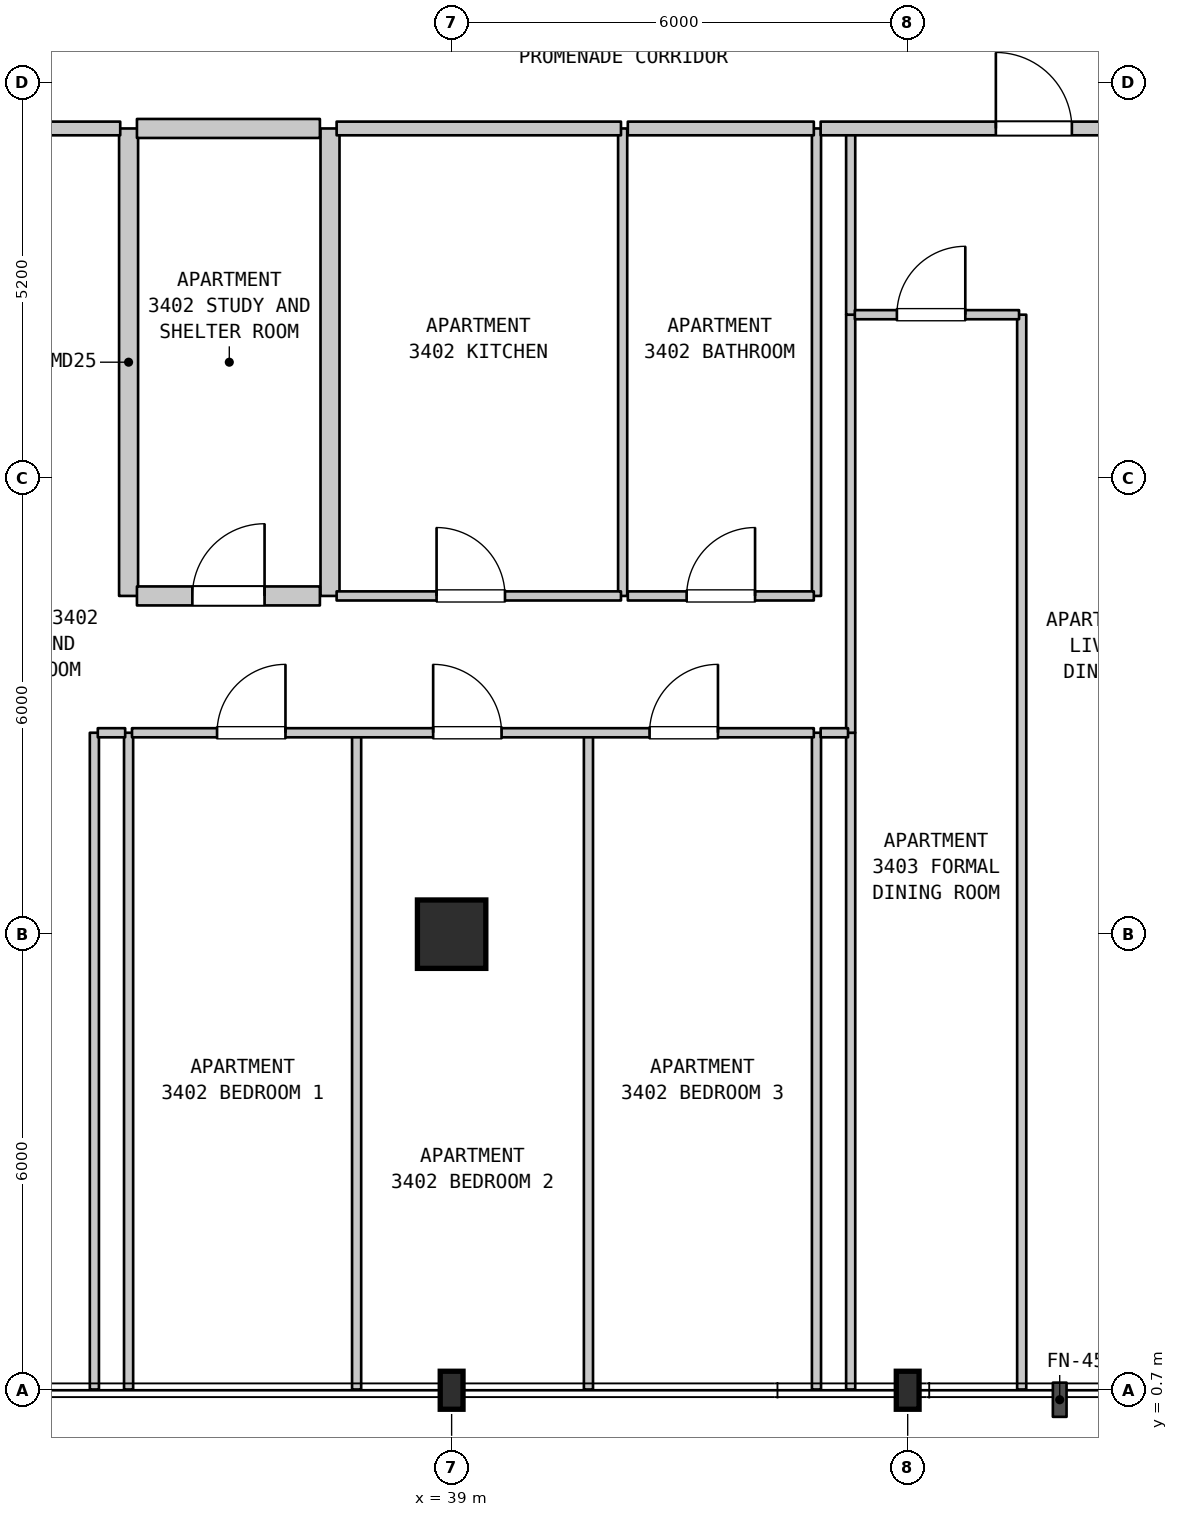
"""IFC4 building model, lengths in metres.
Left out: names, types, materials, properties, quantities, classifications, styles, units other than length and angle.
Written with IfcOpenShell. Run it as: python <this file> out.ifc"""

import sys

from ifc_helpers import new_model, si_unit, direction, frame, frame_2d, origin, origin_2d, place, context, subcontext, project, spatial, rectangle, i_section, extrude, element, fill, save


model = new_model("IFC4")
c1 = context("Model", 3, precision=1e-05, world=origin(), true_north=direction((0.0, 1.0)))
c2 = subcontext(c1, "Body", "Model", "MODEL_VIEW")
j1 = project(units=[si_unit("LENGTHUNIT", "METRE"), si_unit("PLANEANGLEUNIT", "RADIAN")], contexts=[c1])
p1 = place(None, origin())
s1 = spatial("IfcSite", under=j1, at=p1, CompositionType="ELEMENT")
p2 = place(p1, origin())
s2 = spatial("IfcBuilding", under=s1, at=p2, CompositionType="ELEMENT")
p3 = place(p2, frame((0.0, 0.0, 140.9)))
s3 = spatial("IfcBuildingStorey", under=s2, at=p3, CompositionType="ELEMENT", Elevation=140.9)
p4 = place(p3, frame((39.0, 0.7, 0.0), z_axis=(0.0, 0.0, 1.0), x_axis=(1.0, 0.0, 0.0)))
e1 = element("IfcColumn", 1, at=p4, inside=s3, PredefinedType="COLUMN", context=c2, shape_type="SweptSolid", body=[
    extrude(i_section(OverallWidth=0.3, OverallDepth=0.5, WebThickness=0.014, FlangeThickness=0.028, FilletRadius=0.027, at=origin_2d()), origin(), (0.0, 0.0, 1.0), 3.7),
])
p5 = place(p3, frame((39.0, 6.7, 0.0), z_axis=(0.0, 0.0, 1.0), x_axis=(1.0, 0.0, 0.0)))
e2 = element("IfcColumn", 2, at=p5, inside=s3, PredefinedType="COLUMN", context=c2, shape_type="SweptSolid", body=[
    extrude(rectangle(XDim=0.9, YDim=0.9, at=origin_2d()), origin(), (0.0, 0.0, 1.0), 3.7),
])
p6 = place(p3, frame((45.0, 0.7, 0.0), z_axis=(0.0, 0.0, 1.0), x_axis=(1.0, 0.0, 0.0)))
e3 = element("IfcColumn", 3, at=p6, inside=s3, PredefinedType="COLUMN", context=c2, shape_type="SweptSolid", body=[
    extrude(i_section(OverallWidth=0.3, OverallDepth=0.5, WebThickness=0.014, FlangeThickness=0.028, FilletRadius=0.027, at=origin_2d()), origin(), (0.0, 0.0, 1.0), 3.7),
])
for number, where, z_axis, x_axis in (
    (4, (34.3, 0.71, 0.0), (0.0, 0.0, 1.0), (0.0, 1.0, 0.0)),
    (5, (34.75, 0.71, 0.0), (0.0, 0.0, 1.0), (0.0, 1.0, 0.0)),
):
    element("IfcWall", number, at=place(p3, frame(where, z_axis=z_axis, x_axis=x_axis)), inside=s3, PredefinedType="PARTITIONING", context=c2, shape_type="SweptSolid", body=[
        extrude(rectangle(XDim=8.64, YDim=0.12, at=frame_2d((4.32, 0.0))), origin(), (0.0, 0.0, 1.0), 3.385),
    ])
for number, where, z_axis, x_axis in (
    (6, (34.75, 11.15, 0.0), (0.0, 0.0, 1.0), (0.0, 1.0, 0.0)),
    (7, (37.4, 11.15, 0.0), (0.0, 0.0, 1.0), (0.0, 1.0, 0.0)),
):
    element("IfcWall", number, at=place(p3, frame(where, z_axis=z_axis, x_axis=x_axis)), inside=s3, PredefinedType="STANDARD", context=c2, shape_type="SweptSolid", body=[
        extrude(rectangle(XDim=6.15, YDim=0.25, at=frame_2d((3.075, 0.0))), origin(), (0.0, 0.0, 1.0), 3.385),
    ])
for number, where, z_axis, x_axis in (
    (8, (37.75, 0.71, 0.0), (0.0, 0.0, 1.0), (0.0, 1.0, 0.0)),
    (9, (40.8, 0.71, 0.0), (0.0, 0.0, 1.0), (0.0, 1.0, 0.0)),
):
    element("IfcWall", number, at=place(p3, frame(where, z_axis=z_axis, x_axis=x_axis)), inside=s3, PredefinedType="PARTITIONING", context=c2, shape_type="SweptSolid", body=[
        extrude(rectangle(XDim=8.64, YDim=0.12, at=frame_2d((4.32, 0.0))), origin(), (0.0, 0.0, 1.0), 3.385),
    ])
p7 = place(p3, frame((41.25, 11.15, 0.0), z_axis=(0.0, 0.0, 1.0), x_axis=(0.0, 1.0, 0.0)))
e10 = element("IfcWall", 10, at=p7, inside=s3, PredefinedType="PARTITIONING", context=c2, shape_type="SweptSolid", body=[
    extrude(rectangle(XDim=6.15, YDim=0.12, at=frame_2d((3.075, 0.0))), origin(), (0.0, 0.0, 1.0), 3.385),
])
p8 = place(p3, frame((43.8, 0.71, 0.0), z_axis=(0.0, 0.0, 1.0), x_axis=(0.0, 1.0, 0.0)))
e11 = element("IfcWall", 11, at=p8, inside=s3, PredefinedType="PARTITIONING", context=c2, shape_type="SweptSolid", body=[
    extrude(rectangle(XDim=8.64, YDim=0.12, at=frame_2d((4.32, 0.0))), origin(), (0.0, 0.0, 1.0), 3.385),
])
p9 = place(p3, frame((43.8, 11.15, 0.0), z_axis=(0.0, 0.0, 1.0), x_axis=(0.0, 1.0, 0.0)))
e12 = element("IfcWall", 12, at=p9, inside=s3, PredefinedType="PARTITIONING", context=c2, shape_type="SweptSolid", body=[
    extrude(rectangle(XDim=6.15, YDim=0.12, at=frame_2d((3.075, 0.0))), origin(), (0.0, 0.0, 1.0), 3.385),
])
p10 = place(p3, frame((44.25, 0.71, 0.0), z_axis=(0.0, 0.0, 1.0), x_axis=(0.0, 1.0, 0.0)))
e13 = element("IfcWall", 13, at=p10, inside=s3, PredefinedType="PARTITIONING", context=c2, shape_type="SweptSolid", body=[
    extrude(rectangle(XDim=8.64, YDim=0.12, at=frame_2d((4.32, 0.0))), origin(), (0.0, 0.0, 1.0), 3.385),
])
p11 = place(p3, frame((44.25, 9.35, 0.0), z_axis=(0.0, 0.0, 1.0), x_axis=(0.0, 1.0, 0.0)))
e14 = element("IfcWall", 14, at=p11, inside=s3, PredefinedType="PARTITIONING", context=c2, shape_type="SweptSolid", body=[
    extrude(rectangle(XDim=5.5, YDim=0.12, at=frame_2d((2.75, 0.0))), origin(), (0.0, 0.0, 1.0), 3.385),
])
p12 = place(p3, frame((44.25, 14.85, 0.0), z_axis=(0.0, 0.0, 1.0), x_axis=(0.0, 1.0, 0.0)))
e15 = element("IfcWall", 15, at=p12, inside=s3, PredefinedType="PARTITIONING", context=c2, shape_type="SweptSolid", body=[
    extrude(rectangle(XDim=2.45, YDim=0.12, at=frame_2d((1.225, 0.0))), origin(), (0.0, 0.0, 1.0), 3.385),
])
p13 = place(p3, frame((46.5, 0.71, 0.0), z_axis=(0.0, 0.0, 1.0), x_axis=(0.0, 1.0, 0.0)))
e16 = element("IfcWall", 16, at=p13, inside=s3, PredefinedType="PARTITIONING", context=c2, shape_type="SweptSolid", body=[
    extrude(rectangle(XDim=14.14, YDim=0.12, at=frame_2d((7.07, 0.0))), origin(), (0.0, 0.0, 1.0), 3.385),
])
p14 = place(p3, frame((34.345, 9.35, 0.0), z_axis=(0.0, 0.0, 1.0), x_axis=(1.0, 0.0, 0.0)))
e17 = element("IfcWall", 17, at=p14, inside=s3, PredefinedType="PARTITIONING", context=c2, shape_type="SweptSolid", body=[
    extrude(rectangle(XDim=0.36, YDim=0.12, at=frame_2d((0.18, 0.0))), origin(), (0.0, 0.0, 1.0), 3.385),
])
p15 = place(p3, frame((34.795, 9.35, 0.0), z_axis=(0.0, 0.0, 1.0), x_axis=(1.0, 0.0, 0.0)))
e18 = element("IfcWall", 18, at=p15, inside=s3, PredefinedType="PARTITIONING", context=c2, shape_type="SweptSolid", body=[
    extrude(rectangle(XDim=8.97, YDim=0.12, at=frame_2d((4.485, 0.0))), origin(), (0.0, 0.0, 1.0), 3.385),
])
p16 = place(p15, frame((1.119, 0.0, 0.0)))
e19 = element("IfcOpeningElement", 19, at=p16, cuts=e18, PredefinedType="OPENING", context=c2, shape_type="SweptSolid", body=[
    extrude(rectangle(XDim=0.9, YDim=2.15, at=frame_2d((0.45, 1.075))), frame((0.0, 0.07, 0.0), z_axis=(0.0, -1.0, 0.0), x_axis=(1.0, 0.0, 0.0)), (0.0, 0.0, 1.0), 0.14),
])
p17 = place(p15, frame((3.962, 0.0, 0.0)))
e20 = element("IfcOpeningElement", 20, at=p17, cuts=e18, PredefinedType="OPENING", context=c2, shape_type="SweptSolid", body=[
    extrude(rectangle(XDim=0.9, YDim=2.15, at=frame_2d((0.45, 1.075))), frame((0.0, 0.07, 0.0), z_axis=(0.0, -1.0, 0.0), x_axis=(1.0, 0.0, 0.0)), (0.0, 0.0, 1.0), 0.14),
])
p18 = place(p15, frame((6.809, 0.0, 0.0)))
e21 = element("IfcOpeningElement", 21, at=p18, cuts=e18, PredefinedType="OPENING", context=c2, shape_type="SweptSolid", body=[
    extrude(rectangle(XDim=0.9, YDim=2.15, at=frame_2d((0.45, 1.075))), frame((0.0, 0.07, 0.0), z_axis=(0.0, -1.0, 0.0), x_axis=(1.0, 0.0, 0.0)), (0.0, 0.0, 1.0), 0.14),
])
p19 = place(p3, frame((43.855, 9.35, 0.0), z_axis=(0.0, 0.0, 1.0), x_axis=(1.0, 0.0, 0.0)))
e22 = element("IfcWall", 22, at=p19, inside=s3, PredefinedType="PARTITIONING", context=c2, shape_type="SweptSolid", body=[
    extrude(rectangle(XDim=0.36, YDim=0.12, at=frame_2d((0.18, 0.0))), origin(), (0.0, 0.0, 1.0), 3.385),
])
p20 = place(p3, frame((34.86, 11.15, 0.0), z_axis=(0.0, 0.0, 1.0), x_axis=(1.0, 0.0, 0.0)))
e23 = element("IfcWall", 23, at=p20, inside=s3, PredefinedType="STANDARD", context=c2, shape_type="SweptSolid", body=[
    extrude(rectangle(XDim=2.407, YDim=0.25, at=frame_2d((1.204, 0.0))), origin(), (0.0, 0.0, 1.0), 3.385),
])
p21 = place(p20, frame((0.729, 0.0, 0.0)))
e24 = element("IfcOpeningElement", 24, at=p21, cuts=e23, PredefinedType="OPENING", context=c2, shape_type="SweptSolid", body=[
    extrude(rectangle(XDim=0.95, YDim=2.15, at=frame_2d((0.475, 1.075))), frame((0.0, 0.135, 0.0), z_axis=(0.0, -1.0, 0.0), x_axis=(1.0, 0.0, 0.0)), (0.0, 0.0, 1.0), 0.27),
])
p22 = place(p3, frame((37.487, 11.15, 0.0), z_axis=(0.0, 0.0, 1.0), x_axis=(1.0, 0.0, 0.0)))
e25 = element("IfcWall", 25, at=p22, inside=s3, PredefinedType="PARTITIONING", context=c2, shape_type="SweptSolid", body=[
    extrude(rectangle(XDim=3.741, YDim=0.12, at=frame_2d((1.871, 0.0))), origin(), (0.0, 0.0, 1.0), 3.385),
])
p23 = place(p22, frame((1.315, 0.0, 0.0)))
e26 = element("IfcOpeningElement", 26, at=p23, cuts=e25, PredefinedType="OPENING", context=c2, shape_type="SweptSolid", body=[
    extrude(rectangle(XDim=0.9, YDim=2.15, at=frame_2d((0.45, 1.075))), frame((0.0, 0.07, 0.0), z_axis=(0.0, -1.0, 0.0), x_axis=(1.0, 0.0, 0.0)), (0.0, 0.0, 1.0), 0.14),
])
p24 = place(p3, frame((41.318, 11.15, 0.0), z_axis=(0.0, 0.0, 1.0), x_axis=(1.0, 0.0, 0.0)))
e27 = element("IfcWall", 27, at=p24, inside=s3, PredefinedType="PARTITIONING", context=c2, shape_type="SweptSolid", body=[
    extrude(rectangle(XDim=2.447, YDim=0.12, at=frame_2d((1.223, 0.0))), origin(), (0.0, 0.0, 1.0), 3.385),
])
p25 = place(p24, frame((0.774, 0.0, 0.0)))
e28 = element("IfcOpeningElement", 28, at=p25, cuts=e27, PredefinedType="OPENING", context=c2, shape_type="SweptSolid", body=[
    extrude(rectangle(XDim=0.9, YDim=2.1, at=frame_2d((0.45, 1.05))), frame((0.0, 0.07, 0.0), z_axis=(0.0, -1.0, 0.0), x_axis=(1.0, 0.0, 0.0)), (0.0, 0.0, 1.0), 0.14),
])
p26 = place(p3, frame((44.305, 14.85, 0.0), z_axis=(0.0, 0.0, 1.0), x_axis=(1.0, 0.0, 0.0)))
e29 = element("IfcWall", 29, at=p26, inside=s3, PredefinedType="PARTITIONING", context=c2, shape_type="SweptSolid", body=[
    extrude(rectangle(XDim=2.16, YDim=0.12, at=frame_2d((1.08, 0.0))), origin(), (0.0, 0.0, 1.0), 3.385),
])
p27 = place(p26, frame((0.553, 0.0, 0.0)))
e30 = element("IfcOpeningElement", 30, at=p27, cuts=e29, PredefinedType="OPENING", context=c2, shape_type="SweptSolid", body=[
    extrude(rectangle(XDim=0.9, YDim=2.15, at=frame_2d((0.45, 1.075))), frame((0.0, 0.07, 0.0), z_axis=(0.0, -1.0, 0.0), x_axis=(1.0, 0.0, 0.0)), (0.0, 0.0, 1.0), 0.14),
])
p28 = place(p3, frame((29.545, 17.3, 0.0), z_axis=(0.0, 0.0, 1.0), x_axis=(1.0, 0.0, 0.0)))
e31 = element("IfcWall", 31, at=p28, inside=s3, PredefinedType="STANDARD", context=c2, shape_type="SweptSolid", body=[
    extrude(rectangle(XDim=5.095, YDim=0.18, at=frame_2d((2.547, 0.0))), origin(), (0.0, 0.0, 1.0), 3.385),
])
p29 = place(p28, frame((1.792, 0.0, 0.0)))
e32 = element("IfcOpeningElement", 32, at=p29, cuts=e31, PredefinedType="OPENING", context=c2, shape_type="SweptSolid", body=[
    extrude(rectangle(XDim=1.0, YDim=2.15, at=frame_2d((0.5, 1.075))), frame((0.0, 0.1, 0.0), z_axis=(0.0, -1.0, 0.0), x_axis=(1.0, 0.0, 0.0)), (0.0, 0.0, 1.0), 0.2),
])
p30 = place(p3, frame((34.86, 17.3, 0.0), z_axis=(0.0, 0.0, 1.0), x_axis=(1.0, 0.0, 0.0)))
e33 = element("IfcWall", 33, at=p30, inside=s3, PredefinedType="STANDARD", context=c2, shape_type="SweptSolid", body=[
    extrude(rectangle(XDim=2.407, YDim=0.25, at=frame_2d((1.204, 0.0))), origin(), (0.0, 0.0, 1.0), 3.385),
])
p31 = place(p3, frame((37.487, 17.3, 0.0), z_axis=(0.0, 0.0, 1.0), x_axis=(1.0, 0.0, 0.0)))
e34 = element("IfcWall", 34, at=p31, inside=s3, PredefinedType="STANDARD", context=c2, shape_type="SweptSolid", body=[
    extrude(rectangle(XDim=3.741, YDim=0.18, at=frame_2d((1.871, 0.0))), origin(), (0.0, 0.0, 1.0), 3.385),
])
p32 = place(p3, frame((41.318, 17.3, 0.0), z_axis=(0.0, 0.0, 1.0), x_axis=(1.0, 0.0, 0.0)))
e35 = element("IfcWall", 35, at=p32, inside=s3, PredefinedType="STANDARD", context=c2, shape_type="SweptSolid", body=[
    extrude(rectangle(XDim=2.447, YDim=0.18, at=frame_2d((1.223, 0.0))), origin(), (0.0, 0.0, 1.0), 3.385),
])
p33 = place(p3, frame((43.855, 17.3, 0.0), z_axis=(0.0, 0.0, 1.0), x_axis=(1.0, 0.0, 0.0)))
e36 = element("IfcWall", 36, at=p33, inside=s3, PredefinedType="STANDARD", context=c2, shape_type="SweptSolid", body=[
    extrude(rectangle(XDim=5.21, YDim=0.18, at=frame_2d((2.605, 0.0))), origin(), (0.0, 0.0, 1.0), 3.385),
])
p34 = place(p33, frame((2.305, 0.0, 0.0)))
e37 = element("IfcOpeningElement", 37, at=p34, cuts=e36, PredefinedType="OPENING", context=c2, shape_type="SweptSolid", body=[
    extrude(rectangle(XDim=1.0, YDim=2.15, at=frame_2d((0.5, 1.075))), frame((0.0, 0.1, 0.0), z_axis=(0.0, -1.0, 0.0), x_axis=(1.0, 0.0, 0.0)), (0.0, 0.0, 1.0), 0.2),
])
p35 = place(p16, origin())
e38 = element("IfcDoor", 38, at=p35, inside=s3, OperationType="SINGLE_SWING_RIGHT", PredefinedType="DOOR", context=c2, shape_type="SweptSolid", body=[
    extrude(rectangle(XDim=0.9, YDim=2.15, at=frame_2d((0.45, 1.075))), frame((0.0, 0.025, 0.0), z_axis=(0.0, -1.0, 0.0), x_axis=(1.0, 0.0, 0.0)), (0.0, 0.0, 1.0), 0.05),
])
fill(e19, e38)
p36 = place(p17, origin())
e39 = element("IfcDoor", 39, at=p36, inside=s3, OperationType="SINGLE_SWING_LEFT", PredefinedType="DOOR", context=c2, shape_type="SweptSolid", body=[
    extrude(rectangle(XDim=0.9, YDim=2.15, at=frame_2d((0.45, 1.075))), frame((0.0, 0.025, 0.0), z_axis=(0.0, -1.0, 0.0), x_axis=(1.0, 0.0, 0.0)), (0.0, 0.0, 1.0), 0.05),
])
fill(e20, e39)
p37 = place(p18, origin())
e40 = element("IfcDoor", 40, at=p37, inside=s3, OperationType="SINGLE_SWING_RIGHT", PredefinedType="DOOR", context=c2, shape_type="SweptSolid", body=[
    extrude(rectangle(XDim=0.9, YDim=2.15, at=frame_2d((0.45, 1.075))), frame((0.0, 0.025, 0.0), z_axis=(0.0, -1.0, 0.0), x_axis=(1.0, 0.0, 0.0)), (0.0, 0.0, 1.0), 0.05),
])
fill(e21, e40)
p38 = place(p21, origin())
e41 = element("IfcDoor", 41, at=p38, inside=s3, OperationType="SINGLE_SWING_RIGHT", PredefinedType="DOOR", context=c2, shape_type="SweptSolid", body=[
    extrude(rectangle(XDim=0.95, YDim=2.15, at=frame_2d((0.475, 1.075))), frame((0.0, 0.025, 0.0), z_axis=(0.0, -1.0, 0.0), x_axis=(1.0, 0.0, 0.0)), (0.0, 0.0, 1.0), 0.05),
])
fill(e24, e41)
p39 = place(p23, origin())
e42 = element("IfcDoor", 42, at=p39, inside=s3, OperationType="SINGLE_SWING_LEFT", PredefinedType="DOOR", context=c2, shape_type="SweptSolid", body=[
    extrude(rectangle(XDim=0.9, YDim=2.15, at=frame_2d((0.45, 1.075))), frame((0.0, 0.025, 0.0), z_axis=(0.0, -1.0, 0.0), x_axis=(1.0, 0.0, 0.0)), (0.0, 0.0, 1.0), 0.05),
])
fill(e26, e42)
p40 = place(p25, origin())
e43 = element("IfcDoor", 43, at=p40, inside=s3, OperationType="SINGLE_SWING_RIGHT", PredefinedType="DOOR", context=c2, shape_type="SweptSolid", body=[
    extrude(rectangle(XDim=0.9, YDim=2.1, at=frame_2d((0.45, 1.05))), frame((0.0, 0.025, 0.0), z_axis=(0.0, -1.0, 0.0), x_axis=(1.0, 0.0, 0.0)), (0.0, 0.0, 1.0), 0.05),
])
fill(e28, e43)
p41 = place(p27, origin())
e44 = element("IfcDoor", 44, at=p41, inside=s3, OperationType="SINGLE_SWING_RIGHT", PredefinedType="DOOR", context=c2, shape_type="SweptSolid", body=[
    extrude(rectangle(XDim=0.9, YDim=2.15, at=frame_2d((0.45, 1.075))), frame((0.0, 0.025, 0.0), z_axis=(0.0, -1.0, 0.0), x_axis=(1.0, 0.0, 0.0)), (0.0, 0.0, 1.0), 0.05),
])
fill(e30, e44)
p42 = place(p34, origin())
e45 = element("IfcDoor", 45, at=p42, inside=s3, OperationType="SINGLE_SWING_LEFT", PredefinedType="DOOR", context=c2, shape_type="SweptSolid", body=[
    extrude(rectangle(XDim=1.0, YDim=2.15, at=frame_2d((0.5, 1.075))), frame((0.0, 0.025, 0.0), z_axis=(0.0, -1.0, 0.0), x_axis=(1.0, 0.0, 0.0)), (0.0, 0.0, 1.0), 0.05),
])
fill(e37, e45)
save(model, sys.argv[1])
